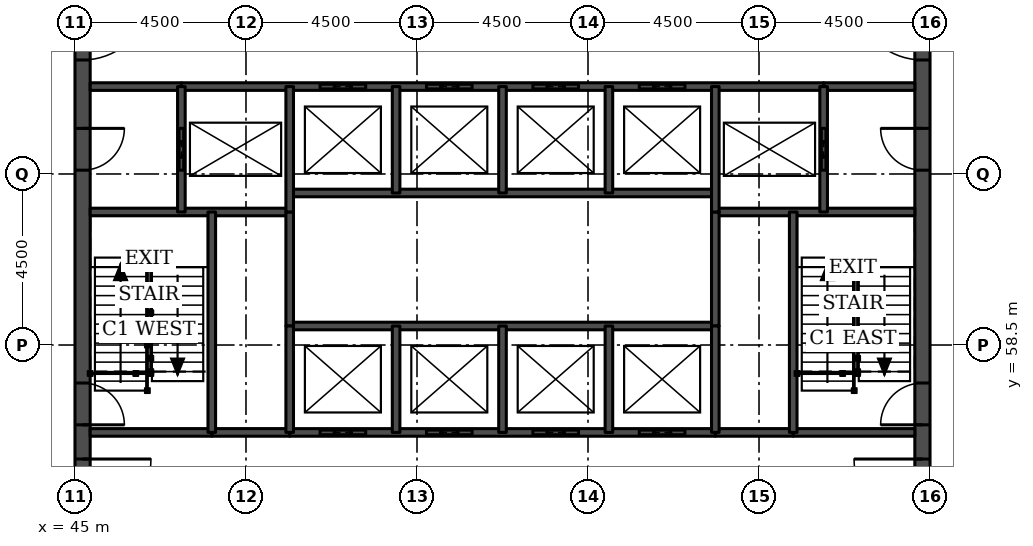
"""IFC4 building model, lengths in metres.
Left out: names, types, materials, properties, quantities, classifications, styles, units other than length and angle.
Written with IfcOpenShell. Run it as: python <this file> out.ifc"""

import sys

from ifc_helpers import new_model, si_unit, direction, frame, frame_2d, origin, place, context, subcontext, project, spatial, rectangle, extrude, element, fill, save


model = new_model("IFC4")
c1 = context("Model", 3, precision=1e-05, world=origin(), true_north=direction((0.0, 1.0)))
c2 = subcontext(c1, "Body", "Model", "MODEL_VIEW")
j1 = project(units=[si_unit("LENGTHUNIT", "METRE"), si_unit("PLANEANGLEUNIT", "RADIAN")], contexts=[c1])
p1 = place(None, origin())
s1 = spatial("IfcSite", under=j1, at=p1, CompositionType="ELEMENT")
p2 = place(p1, origin())
s2 = spatial("IfcBuilding", under=s1, at=p2, CompositionType="ELEMENT")
p3 = place(p2, frame((0.0, 0.0, 173.6)))
s3 = spatial("IfcBuildingStorey", under=s2, at=p3, CompositionType="ELEMENT", Elevation=173.6)
p4 = place(p3, frame((45.2, 49.5, 0.0), z_axis=(0.0, 0.0, 1.0), x_axis=(0.0, 1.0, 0.0)))
e1 = element("IfcWall", 1, at=p4, inside=s3, PredefinedType="SHEAR", context=c2, shape_type="SweptSolid", body=[
    extrude(rectangle(XDim=22.5, YDim=0.4, at=frame_2d((11.25, 0.0))), origin(), (0.0, 0.0, 1.0), 3.7),
])
p5 = place(p4, frame((4.2, 0.0, 0.0)))
e2 = element("IfcOpeningElement", 2, at=p5, cuts=e1, PredefinedType="OPENING", context=c2, shape_type="SweptSolid", body=[
    extrude(rectangle(XDim=1.8, YDim=2.1, at=frame_2d((0.9, 1.05))), frame((0.0, 0.21, 0.0), z_axis=(0.0, -1.0, 0.0), x_axis=(1.0, 0.0, 0.0)), (0.0, 0.0, 1.0), 0.42),
])
p6 = place(p4, frame((6.9, 0.0, 0.0)))
e3 = element("IfcOpeningElement", 3, at=p6, cuts=e1, PredefinedType="OPENING", context=c2, shape_type="SweptSolid", body=[
    extrude(rectangle(XDim=1.1, YDim=2.1, at=frame_2d((0.55, 1.05))), frame((0.0, 0.21, 0.0), z_axis=(0.0, -1.0, 0.0), x_axis=(1.0, 0.0, 0.0)), (0.0, 0.0, 1.0), 0.42),
])
p7 = place(p4, frame((13.6, 0.0, 0.0)))
e4 = element("IfcOpeningElement", 4, at=p7, cuts=e1, PredefinedType="OPENING", context=c2, shape_type="SweptSolid", body=[
    extrude(rectangle(XDim=1.1, YDim=2.1, at=frame_2d((0.55, 1.05))), frame((0.0, 0.21, 0.0), z_axis=(0.0, -1.0, 0.0), x_axis=(1.0, 0.0, 0.0)), (0.0, 0.0, 1.0), 0.42),
])
p8 = place(p4, frame((16.5, 0.0, 0.0)))
e5 = element("IfcOpeningElement", 5, at=p8, cuts=e1, PredefinedType="OPENING", context=c2, shape_type="SweptSolid", body=[
    extrude(rectangle(XDim=1.8, YDim=2.1, at=frame_2d((0.9, 1.05))), frame((0.0, 0.21, 0.0), z_axis=(0.0, -1.0, 0.0), x_axis=(1.0, 0.0, 0.0)), (0.0, 0.0, 1.0), 0.42),
])
p9 = place(p3, frame((67.3, 49.5, 0.0), z_axis=(0.0, 0.0, 1.0), x_axis=(0.0, 1.0, 0.0)))
e6 = element("IfcWall", 6, at=p9, inside=s3, PredefinedType="SHEAR", context=c2, shape_type="SweptSolid", body=[
    extrude(rectangle(XDim=22.5, YDim=0.4, at=frame_2d((11.25, 0.0))), origin(), (0.0, 0.0, 1.0), 3.7),
])
p10 = place(p9, frame((4.2, 0.0, 0.0)))
e7 = element("IfcOpeningElement", 7, at=p10, cuts=e6, PredefinedType="OPENING", context=c2, shape_type="SweptSolid", body=[
    extrude(rectangle(XDim=1.8, YDim=2.1, at=frame_2d((0.9, 1.05))), frame((0.0, 0.21, 0.0), z_axis=(0.0, -1.0, 0.0), x_axis=(1.0, 0.0, 0.0)), (0.0, 0.0, 1.0), 0.42),
])
p11 = place(p9, frame((6.9, 0.0, 0.0)))
e8 = element("IfcOpeningElement", 8, at=p11, cuts=e6, PredefinedType="OPENING", context=c2, shape_type="SweptSolid", body=[
    extrude(rectangle(XDim=1.1, YDim=2.1, at=frame_2d((0.55, 1.05))), frame((0.0, 0.21, 0.0), z_axis=(0.0, -1.0, 0.0), x_axis=(1.0, 0.0, 0.0)), (0.0, 0.0, 1.0), 0.42),
])
p12 = place(p9, frame((13.6, 0.0, 0.0)))
e9 = element("IfcOpeningElement", 9, at=p12, cuts=e6, PredefinedType="OPENING", context=c2, shape_type="SweptSolid", body=[
    extrude(rectangle(XDim=1.1, YDim=2.1, at=frame_2d((0.55, 1.05))), frame((0.0, 0.21, 0.0), z_axis=(0.0, -1.0, 0.0), x_axis=(1.0, 0.0, 0.0)), (0.0, 0.0, 1.0), 0.42),
])
p13 = place(p9, frame((16.5, 0.0, 0.0)))
e10 = element("IfcOpeningElement", 10, at=p13, cuts=e6, PredefinedType="OPENING", context=c2, shape_type="SweptSolid", body=[
    extrude(rectangle(XDim=1.8, YDim=2.1, at=frame_2d((0.9, 1.05))), frame((0.0, 0.21, 0.0), z_axis=(0.0, -1.0, 0.0), x_axis=(1.0, 0.0, 0.0)), (0.0, 0.0, 1.0), 0.42),
])
for number, where, z_axis, x_axis in (
    (11, (48.6, 56.2, 0.0), (0.0, 0.0, 1.0), (1.0, 0.0, 0.0)),
    (12, (61.85, 56.2, 0.0), (0.0, 0.0, 1.0), (1.0, 0.0, 0.0)),
):
    element("IfcWall", number, at=place(p3, frame(where, z_axis=z_axis, x_axis=x_axis)), inside=s3, PredefinedType="SOLIDWALL", context=c2, shape_type="SweptSolid", body=[
        extrude(rectangle(XDim=2.05, YDim=0.2, at=frame_2d((1.025, 0.0))), origin(), (0.0, 0.0, 1.0), 3.55),
    ])
p14 = place(p3, frame((45.4, 56.2, 0.0), z_axis=(0.0, 0.0, 1.0), x_axis=(1.0, 0.0, 0.0)))
e13 = element("IfcWall", 13, at=p14, inside=s3, PredefinedType="SOLIDWALL", context=c2, shape_type="SweptSolid", body=[
    extrude(rectangle(XDim=3.2, YDim=0.2, at=frame_2d((1.6, 0.0))), origin(), (0.0, 0.0, 1.0), 3.55),
])
p15 = place(p3, frame((50.65, 56.2, 0.0), z_axis=(0.0, 0.0, 1.0), x_axis=(1.0, 0.0, 0.0)))
e14 = element("IfcWall", 14, at=p15, inside=s3, PredefinedType="SOLIDWALL", context=c2, shape_type="SweptSolid", body=[
    extrude(rectangle(XDim=11.2, YDim=0.2, at=frame_2d((5.6, 0.0))), origin(), (0.0, 0.0, 1.0), 3.55),
])
p16 = place(p15, frame((0.8, 0.0, 0.0)))
e15 = element("IfcOpeningElement", 15, at=p16, cuts=e14, PredefinedType="OPENING", context=c2, shape_type="SweptSolid", body=[
    extrude(rectangle(XDim=1.2, YDim=2.1, at=frame_2d((0.6, 1.05))), frame((0.0, 0.11, 0.0), z_axis=(0.0, -1.0, 0.0), x_axis=(1.0, 0.0, 0.0)), (0.0, 0.0, 1.0), 0.22),
])
p17 = place(p15, frame((3.6, 0.0, 0.0)))
e16 = element("IfcOpeningElement", 16, at=p17, cuts=e14, PredefinedType="OPENING", context=c2, shape_type="SweptSolid", body=[
    extrude(rectangle(XDim=1.2, YDim=2.1, at=frame_2d((0.6, 1.05))), frame((0.0, 0.11, 0.0), z_axis=(0.0, -1.0, 0.0), x_axis=(1.0, 0.0, 0.0)), (0.0, 0.0, 1.0), 0.22),
])
p18 = place(p15, frame((6.4, 0.0, 0.0)))
e17 = element("IfcOpeningElement", 17, at=p18, cuts=e14, PredefinedType="OPENING", context=c2, shape_type="SweptSolid", body=[
    extrude(rectangle(XDim=1.2, YDim=2.1, at=frame_2d((0.6, 1.05))), frame((0.0, 0.11, 0.0), z_axis=(0.0, -1.0, 0.0), x_axis=(1.0, 0.0, 0.0)), (0.0, 0.0, 1.0), 0.22),
])
p19 = place(p15, frame((9.2, 0.0, 0.0)))
e18 = element("IfcOpeningElement", 18, at=p19, cuts=e14, PredefinedType="OPENING", context=c2, shape_type="SweptSolid", body=[
    extrude(rectangle(XDim=1.2, YDim=2.1, at=frame_2d((0.6, 1.05))), frame((0.0, 0.11, 0.0), z_axis=(0.0, -1.0, 0.0), x_axis=(1.0, 0.0, 0.0)), (0.0, 0.0, 1.0), 0.22),
])
p20 = place(p3, frame((63.9, 56.2, 0.0), z_axis=(0.0, 0.0, 1.0), x_axis=(1.0, 0.0, 0.0)))
e19 = element("IfcWall", 19, at=p20, inside=s3, PredefinedType="SOLIDWALL", context=c2, shape_type="SweptSolid", body=[
    extrude(rectangle(XDim=3.2, YDim=0.2, at=frame_2d((1.6, 0.0))), origin(), (0.0, 0.0, 1.0), 3.55),
])
p21 = place(p3, frame((50.65, 59.0, 0.0), z_axis=(0.0, 0.0, 1.0), x_axis=(1.0, 0.0, 0.0)))
e20 = element("IfcWall", 20, at=p21, inside=s3, PredefinedType="SOLIDWALL", context=c2, shape_type="SweptSolid", body=[
    extrude(rectangle(XDim=11.2, YDim=0.2, at=frame_2d((5.6, 0.0))), origin(), (0.0, 0.0, 1.0), 3.7),
])
for number, where, z_axis, x_axis in (
    (21, (45.4, 62.0, 0.0), (0.0, 0.0, 1.0), (1.0, 0.0, 0.0)),
    (22, (61.85, 62.0, 0.0), (0.0, 0.0, 1.0), (1.0, 0.0, 0.0)),
):
    element("IfcWall", number, at=place(p3, frame(where, z_axis=z_axis, x_axis=x_axis)), inside=s3, PredefinedType="SOLIDWALL", context=c2, shape_type="SweptSolid", body=[
        extrude(rectangle(XDim=5.25, YDim=0.2, at=frame_2d((2.625, 0.0))), origin(), (0.0, 0.0, 1.0), 3.55),
    ])
p22 = place(p3, frame((50.65, 62.5, 0.0), z_axis=(0.0, 0.0, 1.0), x_axis=(1.0, 0.0, 0.0)))
e23 = element("IfcWall", 23, at=p22, inside=s3, PredefinedType="SOLIDWALL", context=c2, shape_type="SweptSolid", body=[
    extrude(rectangle(XDim=11.2, YDim=0.2, at=frame_2d((5.6, 0.0))), origin(), (0.0, 0.0, 1.0), 3.7),
])
for number, where, z_axis, x_axis in (
    (24, (45.4, 65.3, 0.0), (0.0, 0.0, 1.0), (1.0, 0.0, 0.0)),
    (25, (64.7, 65.3, 0.0), (0.0, 0.0, 1.0), (1.0, 0.0, 0.0)),
):
    element("IfcWall", number, at=place(p3, frame(where, z_axis=z_axis, x_axis=x_axis)), inside=s3, PredefinedType="SOLIDWALL", context=c2, shape_type="SweptSolid", body=[
        extrude(rectangle(XDim=2.4, YDim=0.2, at=frame_2d((1.2, 0.0))), origin(), (0.0, 0.0, 1.0), 3.55),
    ])
p23 = place(p3, frame((47.8, 65.3, 0.0), z_axis=(0.0, 0.0, 1.0), x_axis=(1.0, 0.0, 0.0)))
e26 = element("IfcWall", 26, at=p23, inside=s3, PredefinedType="SOLIDWALL", context=c2, shape_type="SweptSolid", body=[
    extrude(rectangle(XDim=16.9, YDim=0.2, at=frame_2d((8.45, 0.0))), origin(), (0.0, 0.0, 1.0), 3.55),
])
p24 = place(p23, frame((3.65, 0.0, 0.0)))
e27 = element("IfcOpeningElement", 27, at=p24, cuts=e26, PredefinedType="OPENING", context=c2, shape_type="SweptSolid", body=[
    extrude(rectangle(XDim=1.2, YDim=2.1, at=frame_2d((0.6, 1.05))), frame((0.0, 0.11, 0.0), z_axis=(0.0, -1.0, 0.0), x_axis=(1.0, 0.0, 0.0)), (0.0, 0.0, 1.0), 0.22),
])
p25 = place(p23, frame((6.45, 0.0, 0.0)))
e28 = element("IfcOpeningElement", 28, at=p25, cuts=e26, PredefinedType="OPENING", context=c2, shape_type="SweptSolid", body=[
    extrude(rectangle(XDim=1.2, YDim=2.1, at=frame_2d((0.6, 1.05))), frame((0.0, 0.11, 0.0), z_axis=(0.0, -1.0, 0.0), x_axis=(1.0, 0.0, 0.0)), (0.0, 0.0, 1.0), 0.22),
])
p26 = place(p23, frame((9.25, 0.0, 0.0)))
e29 = element("IfcOpeningElement", 29, at=p26, cuts=e26, PredefinedType="OPENING", context=c2, shape_type="SweptSolid", body=[
    extrude(rectangle(XDim=1.2, YDim=2.1, at=frame_2d((0.6, 1.05))), frame((0.0, 0.11, 0.0), z_axis=(0.0, -1.0, 0.0), x_axis=(1.0, 0.0, 0.0)), (0.0, 0.0, 1.0), 0.22),
])
p27 = place(p23, frame((12.05, 0.0, 0.0)))
e30 = element("IfcOpeningElement", 30, at=p27, cuts=e26, PredefinedType="OPENING", context=c2, shape_type="SweptSolid", body=[
    extrude(rectangle(XDim=1.2, YDim=2.1, at=frame_2d((0.6, 1.05))), frame((0.0, 0.11, 0.0), z_axis=(0.0, -1.0, 0.0), x_axis=(1.0, 0.0, 0.0)), (0.0, 0.0, 1.0), 0.22),
])
p28 = place(p3, frame((47.8, 62.0, 0.0), z_axis=(0.0, 0.0, 1.0), x_axis=(0.0, 1.0, 0.0)))
e31 = element("IfcWall", 31, at=p28, inside=s3, PredefinedType="SOLIDWALL", context=c2, shape_type="SweptSolid", body=[
    extrude(rectangle(XDim=3.3, YDim=0.2, at=frame_2d((1.65, 0.0))), origin(), (0.0, 0.0, 1.0), 3.55),
])
p29 = place(p28, frame((1.1, 0.0, 0.0)))
e32 = element("IfcOpeningElement", 32, at=p29, cuts=e31, PredefinedType="OPENING", context=c2, shape_type="SweptSolid", body=[
    extrude(rectangle(XDim=1.1, YDim=2.1, at=frame_2d((0.55, 1.05))), frame((0.0, 0.11, 0.0), z_axis=(0.0, -1.0, 0.0), x_axis=(1.0, 0.0, 0.0)), (0.0, 0.0, 1.0), 0.22),
])
p30 = place(p3, frame((48.6, 56.2, 0.0), z_axis=(0.0, 0.0, 1.0), x_axis=(0.0, 1.0, 0.0)))
e33 = element("IfcWall", 33, at=p30, inside=s3, PredefinedType="SOLIDWALL", context=c2, shape_type="SweptSolid", body=[
    extrude(rectangle(XDim=5.8, YDim=0.2, at=frame_2d((2.9, 0.0))), origin(), (0.0, 0.0, 1.0), 3.55),
])
p31 = place(p3, frame((50.65, 59.0, 0.0), z_axis=(0.0, 0.0, 1.0), x_axis=(0.0, 1.0, 0.0)))
e34 = element("IfcWall", 34, at=p31, inside=s3, PredefinedType="SOLIDWALL", context=c2, shape_type="SweptSolid", body=[
    extrude(rectangle(XDim=3.0, YDim=0.2, at=frame_2d((1.5, 0.0))), origin(), (0.0, 0.0, 1.0), 3.7),
])
p32 = place(p3, frame((50.65, 56.2, 0.0), z_axis=(0.0, 0.0, 1.0), x_axis=(0.0, 1.0, 0.0)))
e35 = element("IfcWall", 35, at=p32, inside=s3, PredefinedType="SOLIDWALL", context=c2, shape_type="SweptSolid", body=[
    extrude(rectangle(XDim=2.8, YDim=0.2, at=frame_2d((1.4, 0.0))), origin(), (0.0, 0.0, 1.0), 3.55),
])
p33 = place(p3, frame((50.65, 62.0, 0.0), z_axis=(0.0, 0.0, 1.0), x_axis=(0.0, 1.0, 0.0)))
e36 = element("IfcWall", 36, at=p33, inside=s3, PredefinedType="SOLIDWALL", context=c2, shape_type="SweptSolid", body=[
    extrude(rectangle(XDim=3.3, YDim=0.2, at=frame_2d((1.65, 0.0))), origin(), (0.0, 0.0, 1.0), 3.55),
])
for number, where, z_axis, x_axis in (
    (37, (53.45, 56.2, 0.0), (0.0, 0.0, 1.0), (0.0, 1.0, 0.0)),
    (38, (53.45, 62.5, 0.0), (0.0, 0.0, 1.0), (0.0, 1.0, 0.0)),
    (39, (56.25, 56.2, 0.0), (0.0, 0.0, 1.0), (0.0, 1.0, 0.0)),
    (40, (56.25, 62.5, 0.0), (0.0, 0.0, 1.0), (0.0, 1.0, 0.0)),
    (41, (59.05, 56.2, 0.0), (0.0, 0.0, 1.0), (0.0, 1.0, 0.0)),
    (42, (59.05, 62.5, 0.0), (0.0, 0.0, 1.0), (0.0, 1.0, 0.0)),
):
    element("IfcWall", number, at=place(p3, frame(where, z_axis=z_axis, x_axis=x_axis)), inside=s3, PredefinedType="SOLIDWALL", context=c2, shape_type="SweptSolid", body=[
        extrude(rectangle(XDim=2.8, YDim=0.2, at=frame_2d((1.4, 0.0))), origin(), (0.0, 0.0, 1.0), 3.55),
    ])
p34 = place(p3, frame((61.85, 59.0, 0.0), z_axis=(0.0, 0.0, 1.0), x_axis=(0.0, 1.0, 0.0)))
e43 = element("IfcWall", 43, at=p34, inside=s3, PredefinedType="SOLIDWALL", context=c2, shape_type="SweptSolid", body=[
    extrude(rectangle(XDim=3.0, YDim=0.2, at=frame_2d((1.5, 0.0))), origin(), (0.0, 0.0, 1.0), 3.7),
])
p35 = place(p3, frame((61.85, 56.2, 0.0), z_axis=(0.0, 0.0, 1.0), x_axis=(0.0, 1.0, 0.0)))
e44 = element("IfcWall", 44, at=p35, inside=s3, PredefinedType="SOLIDWALL", context=c2, shape_type="SweptSolid", body=[
    extrude(rectangle(XDim=2.8, YDim=0.2, at=frame_2d((1.4, 0.0))), origin(), (0.0, 0.0, 1.0), 3.55),
])
p36 = place(p3, frame((61.85, 62.0, 0.0), z_axis=(0.0, 0.0, 1.0), x_axis=(0.0, 1.0, 0.0)))
e45 = element("IfcWall", 45, at=p36, inside=s3, PredefinedType="SOLIDWALL", context=c2, shape_type="SweptSolid", body=[
    extrude(rectangle(XDim=3.3, YDim=0.2, at=frame_2d((1.65, 0.0))), origin(), (0.0, 0.0, 1.0), 3.55),
])
p37 = place(p3, frame((63.9, 56.2, 0.0), z_axis=(0.0, 0.0, 1.0), x_axis=(0.0, 1.0, 0.0)))
e46 = element("IfcWall", 46, at=p37, inside=s3, PredefinedType="SOLIDWALL", context=c2, shape_type="SweptSolid", body=[
    extrude(rectangle(XDim=5.8, YDim=0.2, at=frame_2d((2.9, 0.0))), origin(), (0.0, 0.0, 1.0), 3.55),
])
p38 = place(p3, frame((64.7, 62.0, 0.0), z_axis=(0.0, 0.0, 1.0), x_axis=(0.0, 1.0, 0.0)))
e47 = element("IfcWall", 47, at=p38, inside=s3, PredefinedType="SOLIDWALL", context=c2, shape_type="SweptSolid", body=[
    extrude(rectangle(XDim=3.3, YDim=0.2, at=frame_2d((1.65, 0.0))), origin(), (0.0, 0.0, 1.0), 3.55),
])
p39 = place(p38, frame((1.1, 0.0, 0.0)))
e48 = element("IfcOpeningElement", 48, at=p39, cuts=e47, PredefinedType="OPENING", context=c2, shape_type="SweptSolid", body=[
    extrude(rectangle(XDim=1.1, YDim=2.1, at=frame_2d((0.55, 1.05))), frame((0.0, 0.11, 0.0), z_axis=(0.0, -1.0, 0.0), x_axis=(1.0, 0.0, 0.0)), (0.0, 0.0, 1.0), 0.22),
])
p40 = place(p16, origin())
e49 = element("IfcDoor", 49, at=p40, inside=s3, OperationType="DOUBLE_DOOR_SLIDING", PredefinedType="DOOR", context=c2, shape_type="SweptSolid", body=[
    extrude(rectangle(XDim=1.2, YDim=2.1, at=frame_2d((0.6, 1.05))), frame((0.0, 0.025, 0.0), z_axis=(0.0, -1.0, 0.0), x_axis=(1.0, 0.0, 0.0)), (0.0, 0.0, 1.0), 0.05),
])
fill(e15, e49)
p41 = place(p17, origin())
e50 = element("IfcDoor", 50, at=p41, inside=s3, OperationType="DOUBLE_DOOR_SLIDING", PredefinedType="DOOR", context=c2, shape_type="SweptSolid", body=[
    extrude(rectangle(XDim=1.2, YDim=2.1, at=frame_2d((0.6, 1.05))), frame((0.0, 0.025, 0.0), z_axis=(0.0, -1.0, 0.0), x_axis=(1.0, 0.0, 0.0)), (0.0, 0.0, 1.0), 0.05),
])
fill(e16, e50)
p42 = place(p18, origin())
e51 = element("IfcDoor", 51, at=p42, inside=s3, OperationType="DOUBLE_DOOR_SLIDING", PredefinedType="DOOR", context=c2, shape_type="SweptSolid", body=[
    extrude(rectangle(XDim=1.2, YDim=2.1, at=frame_2d((0.6, 1.05))), frame((0.0, 0.025, 0.0), z_axis=(0.0, -1.0, 0.0), x_axis=(1.0, 0.0, 0.0)), (0.0, 0.0, 1.0), 0.05),
])
fill(e17, e51)
p43 = place(p19, origin())
e52 = element("IfcDoor", 52, at=p43, inside=s3, OperationType="DOUBLE_DOOR_SLIDING", PredefinedType="DOOR", context=c2, shape_type="SweptSolid", body=[
    extrude(rectangle(XDim=1.2, YDim=2.1, at=frame_2d((0.6, 1.05))), frame((0.0, 0.025, 0.0), z_axis=(0.0, -1.0, 0.0), x_axis=(1.0, 0.0, 0.0)), (0.0, 0.0, 1.0), 0.05),
])
fill(e18, e52)
p44 = place(p24, origin())
e53 = element("IfcDoor", 53, at=p44, inside=s3, OperationType="DOUBLE_DOOR_SLIDING", PredefinedType="DOOR", context=c2, shape_type="SweptSolid", body=[
    extrude(rectangle(XDim=1.2, YDim=2.1, at=frame_2d((0.6, 1.05))), frame((0.0, 0.025, 0.0), z_axis=(0.0, -1.0, 0.0), x_axis=(1.0, 0.0, 0.0)), (0.0, 0.0, 1.0), 0.05),
])
fill(e27, e53)
p45 = place(p25, origin())
e54 = element("IfcDoor", 54, at=p45, inside=s3, OperationType="DOUBLE_DOOR_SLIDING", PredefinedType="DOOR", context=c2, shape_type="SweptSolid", body=[
    extrude(rectangle(XDim=1.2, YDim=2.1, at=frame_2d((0.6, 1.05))), frame((0.0, 0.025, 0.0), z_axis=(0.0, -1.0, 0.0), x_axis=(1.0, 0.0, 0.0)), (0.0, 0.0, 1.0), 0.05),
])
fill(e28, e54)
p46 = place(p26, origin())
e55 = element("IfcDoor", 55, at=p46, inside=s3, OperationType="DOUBLE_DOOR_SLIDING", PredefinedType="DOOR", context=c2, shape_type="SweptSolid", body=[
    extrude(rectangle(XDim=1.2, YDim=2.1, at=frame_2d((0.6, 1.05))), frame((0.0, 0.025, 0.0), z_axis=(0.0, -1.0, 0.0), x_axis=(1.0, 0.0, 0.0)), (0.0, 0.0, 1.0), 0.05),
])
fill(e29, e55)
p47 = place(p27, origin())
e56 = element("IfcDoor", 56, at=p47, inside=s3, OperationType="DOUBLE_DOOR_SLIDING", PredefinedType="DOOR", context=c2, shape_type="SweptSolid", body=[
    extrude(rectangle(XDim=1.2, YDim=2.1, at=frame_2d((0.6, 1.05))), frame((0.0, 0.025, 0.0), z_axis=(0.0, -1.0, 0.0), x_axis=(1.0, 0.0, 0.0)), (0.0, 0.0, 1.0), 0.05),
])
fill(e30, e56)
p48 = place(p29, origin())
e57 = element("IfcDoor", 57, at=p48, inside=s3, OperationType="DOUBLE_DOOR_SLIDING", PredefinedType="DOOR", context=c2, shape_type="SweptSolid", body=[
    extrude(rectangle(XDim=1.1, YDim=2.1, at=frame_2d((0.55, 1.05))), frame((0.0, 0.025, 0.0), z_axis=(0.0, -1.0, 0.0), x_axis=(1.0, 0.0, 0.0)), (0.0, 0.0, 1.0), 0.05),
])
fill(e32, e57)
p49 = place(p39, origin())
e58 = element("IfcDoor", 58, at=p49, inside=s3, OperationType="DOUBLE_DOOR_SLIDING", PredefinedType="DOOR", context=c2, shape_type="SweptSolid", body=[
    extrude(rectangle(XDim=1.1, YDim=2.1, at=frame_2d((0.55, 1.05))), frame((0.0, 0.025, 0.0), z_axis=(0.0, -1.0, 0.0), x_axis=(1.0, 0.0, 0.0)), (0.0, 0.0, 1.0), 0.05),
])
fill(e48, e58)
p50 = place(p5, frame((1.8, 0.0, 0.0), z_axis=(0.0, 0.0, 1.0), x_axis=(-1.0, 0.0, 0.0)))
e59 = element("IfcDoor", 59, at=p50, inside=s3, OperationType="SINGLE_SWING_LEFT", PredefinedType="DOOR", context=c2, shape_type="SweptSolid", body=[
    extrude(rectangle(XDim=1.8, YDim=2.1, at=frame_2d((0.9, 1.05))), frame((0.0, 0.025, 0.0), z_axis=(0.0, -1.0, 0.0), x_axis=(1.0, 0.0, 0.0)), (0.0, 0.0, 1.0), 0.05),
])
fill(e2, e59)
p51 = place(p6, frame((1.1, 0.0, 0.0), z_axis=(0.0, 0.0, 1.0), x_axis=(-1.0, 0.0, 0.0)))
e60 = element("IfcDoor", 60, at=p51, inside=s3, OperationType="SINGLE_SWING_RIGHT", PredefinedType="DOOR", context=c2, shape_type="SweptSolid", body=[
    extrude(rectangle(XDim=1.1, YDim=2.1, at=frame_2d((0.55, 1.05))), frame((0.0, 0.025, 0.0), z_axis=(0.0, -1.0, 0.0), x_axis=(1.0, 0.0, 0.0)), (0.0, 0.0, 1.0), 0.05),
])
fill(e3, e60)
p52 = place(p7, frame((1.1, 0.0, 0.0), z_axis=(0.0, 0.0, 1.0), x_axis=(-1.0, 0.0, 0.0)))
e61 = element("IfcDoor", 61, at=p52, inside=s3, OperationType="SINGLE_SWING_LEFT", PredefinedType="DOOR", context=c2, shape_type="SweptSolid", body=[
    extrude(rectangle(XDim=1.1, YDim=2.1, at=frame_2d((0.55, 1.05))), frame((0.0, 0.025, 0.0), z_axis=(0.0, -1.0, 0.0), x_axis=(1.0, 0.0, 0.0)), (0.0, 0.0, 1.0), 0.05),
])
fill(e4, e61)
p53 = place(p8, frame((1.8, 0.0, 0.0), z_axis=(0.0, 0.0, 1.0), x_axis=(-1.0, 0.0, 0.0)))
e62 = element("IfcDoor", 62, at=p53, inside=s3, OperationType="SINGLE_SWING_LEFT", PredefinedType="DOOR", context=c2, shape_type="SweptSolid", body=[
    extrude(rectangle(XDim=1.8, YDim=2.1, at=frame_2d((0.9, 1.05))), frame((0.0, 0.025, 0.0), z_axis=(0.0, -1.0, 0.0), x_axis=(1.0, 0.0, 0.0)), (0.0, 0.0, 1.0), 0.05),
])
fill(e5, e62)
p54 = place(p10, origin())
e63 = element("IfcDoor", 63, at=p54, inside=s3, OperationType="SINGLE_SWING_RIGHT", PredefinedType="DOOR", context=c2, shape_type="SweptSolid", body=[
    extrude(rectangle(XDim=1.8, YDim=2.1, at=frame_2d((0.9, 1.05))), frame((0.0, 0.025, 0.0), z_axis=(0.0, -1.0, 0.0), x_axis=(1.0, 0.0, 0.0)), (0.0, 0.0, 1.0), 0.05),
])
fill(e7, e63)
p55 = place(p11, origin())
e64 = element("IfcDoor", 64, at=p55, inside=s3, OperationType="SINGLE_SWING_LEFT", PredefinedType="DOOR", context=c2, shape_type="SweptSolid", body=[
    extrude(rectangle(XDim=1.1, YDim=2.1, at=frame_2d((0.55, 1.05))), frame((0.0, 0.025, 0.0), z_axis=(0.0, -1.0, 0.0), x_axis=(1.0, 0.0, 0.0)), (0.0, 0.0, 1.0), 0.05),
])
fill(e8, e64)
p56 = place(p12, origin())
e65 = element("IfcDoor", 65, at=p56, inside=s3, OperationType="SINGLE_SWING_RIGHT", PredefinedType="DOOR", context=c2, shape_type="SweptSolid", body=[
    extrude(rectangle(XDim=1.1, YDim=2.1, at=frame_2d((0.55, 1.05))), frame((0.0, 0.025, 0.0), z_axis=(0.0, -1.0, 0.0), x_axis=(1.0, 0.0, 0.0)), (0.0, 0.0, 1.0), 0.05),
])
fill(e9, e65)
p57 = place(p13, origin())
e66 = element("IfcDoor", 66, at=p57, inside=s3, OperationType="SINGLE_SWING_RIGHT", PredefinedType="DOOR", context=c2, shape_type="SweptSolid", body=[
    extrude(rectangle(XDim=1.8, YDim=2.1, at=frame_2d((0.9, 1.05))), frame((0.0, 0.025, 0.0), z_axis=(0.0, -1.0, 0.0), x_axis=(1.0, 0.0, 0.0)), (0.0, 0.0, 1.0), 0.05),
])
fill(e10, e66)
save(model, sys.argv[1])
